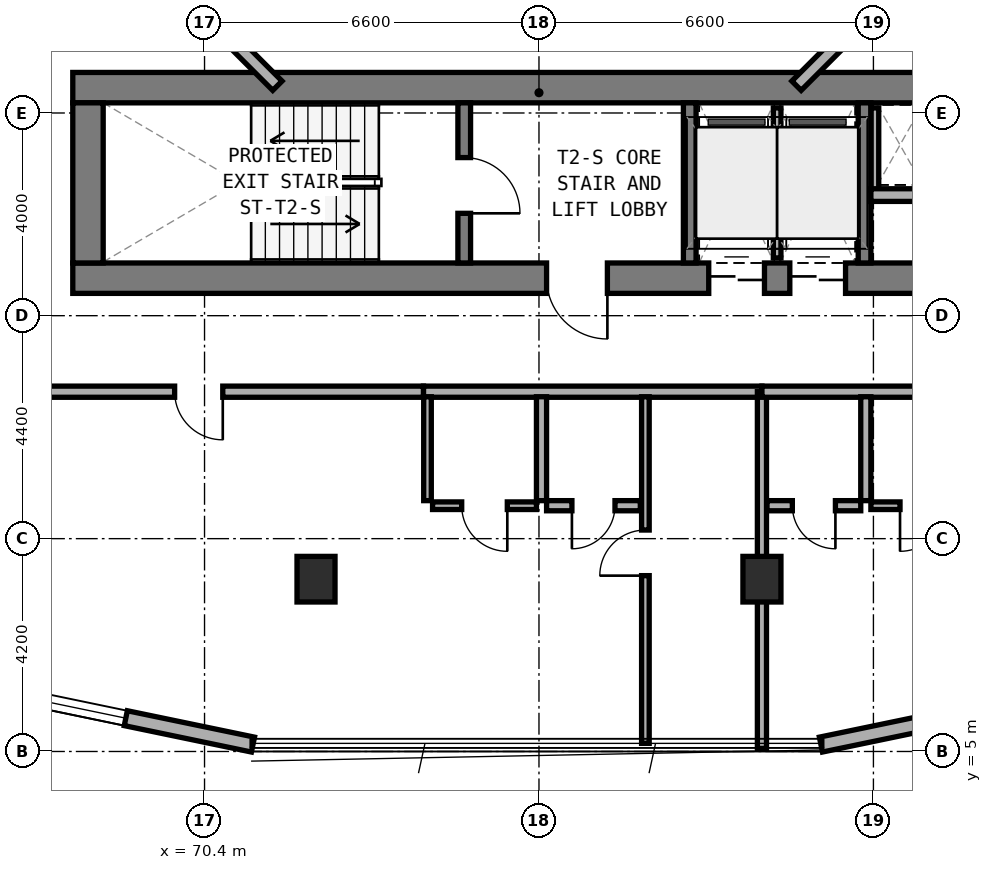
"""IFC4 building model, lengths in metres.
Left out: names, types, materials, properties, quantities, classifications, styles, units other than length and angle.
Written with IfcOpenShell. Run it as: python <this file> out.ifc"""

import sys

from ifc_helpers import new_model, si_unit, direction, frame, frame_2d, origin, origin_2d, place, context, subcontext, project, spatial, rectangle, extrude, element, fill, save


model = new_model("IFC4")
c1 = context("Model", 3, precision=1e-05, world=origin(), true_north=direction((0.0, 1.0)))
c2 = subcontext(c1, "Body", "Model", "MODEL_VIEW")
j1 = project(units=[si_unit("LENGTHUNIT", "METRE"), si_unit("PLANEANGLEUNIT", "RADIAN")], contexts=[c1])
p1 = place(None, origin())
s1 = spatial("IfcSite", under=j1, at=p1, CompositionType="ELEMENT")
p2 = place(p1, origin())
s2 = spatial("IfcBuilding", under=s1, at=p2, CompositionType="ELEMENT")
p3 = place(p2, frame((0.0, 0.0, 45.0)))
s3 = spatial("IfcBuildingStorey", under=s2, at=p3, CompositionType="ELEMENT", Elevation=45.0)
p4 = place(p3, frame((67.8, 14.34, 0.0), z_axis=(0.0, 0.0, 1.0), x_axis=(1.0, 0.0, 0.0)))
e1 = element("IfcWall", 1, at=p4, inside=s3, PredefinedType="SHEAR", context=c2, shape_type="SweptSolid", body=[
    extrude(rectangle(XDim=18.6, YDim=0.6, at=frame_2d((9.3, 0.0))), origin(), (0.0, 0.0, 1.0), 3.5),
])
p5 = place(p4, frame((9.35, 0.0, 0.0)))
e2 = element("IfcOpeningElement", 2, at=p5, cuts=e1, PredefinedType="OPENING", context=c2, shape_type="SweptSolid", body=[
    extrude(rectangle(XDim=1.2, YDim=2.15, at=frame_2d((0.6, 1.075))), frame((0.0, 0.31, 0.0), z_axis=(0.0, -1.0, 0.0), x_axis=(1.0, 0.0, 0.0)), (0.0, 0.0, 1.0), 0.62),
])
p6 = place(p4, frame((16.95, 0.0, 0.0)))
e3 = element("IfcOpeningElement", 3, at=p6, cuts=e1, PredefinedType="OPENING", context=c2, shape_type="SweptSolid", body=[
    extrude(rectangle(XDim=0.85, YDim=2.1, at=frame_2d((0.425, 1.05))), frame((0.0, 0.31, 0.0), z_axis=(0.0, -1.0, 0.0), x_axis=(1.0, 0.0, 0.0)), (0.0, 0.0, 1.0), 0.62),
])
p7 = place(p4, frame((12.55, 0.0, 0.0)))
e4 = element("IfcOpeningElement", 4, at=p7, cuts=e1, PredefinedType="OPENING", context=c2, shape_type="SweptSolid", body=[
    extrude(rectangle(XDim=1.1, YDim=2.15, at=frame_2d((0.55, 1.075))), frame((0.0, 0.31, 0.0), z_axis=(0.0, -1.0, 0.0), x_axis=(1.0, 0.0, 0.0)), (0.0, 0.0, 1.0), 0.62),
])
p8 = place(p4, frame((14.15, 0.0, 0.0)))
e5 = element("IfcOpeningElement", 5, at=p8, cuts=e1, PredefinedType="OPENING", context=c2, shape_type="SweptSolid", body=[
    extrude(rectangle(XDim=1.1, YDim=2.15, at=frame_2d((0.55, 1.075))), frame((0.0, 0.31, 0.0), z_axis=(0.0, -1.0, 0.0), x_axis=(1.0, 0.0, 0.0)), (0.0, 0.0, 1.0), 0.62),
])
p9 = place(p3, frame((67.8, 18.1, 0.0), z_axis=(0.0, 0.0, 1.0), x_axis=(1.0, 0.0, 0.0)))
e6 = element("IfcWall", 6, at=p9, inside=s3, PredefinedType="SHEAR", context=c2, shape_type="SweptSolid", body=[
    extrude(rectangle(XDim=18.6, YDim=0.6, at=frame_2d((9.3, 0.0))), origin(), (0.0, 0.0, 1.0), 3.5),
])
p10 = place(p3, frame((68.1, 14.64, 0.0), z_axis=(0.0, 0.0, 1.0), x_axis=(0.0, 1.0, 0.0)))
e7 = element("IfcWall", 7, at=p10, inside=s3, PredefinedType="SHEAR", context=c2, shape_type="SweptSolid", body=[
    extrude(rectangle(XDim=3.16, YDim=0.6, at=frame_2d((1.58, 0.0))), origin(), (0.0, 0.0, 1.0), 3.5),
])
p11 = place(p3, frame((75.525, 14.64, 0.0), z_axis=(0.0, 0.0, 1.0), x_axis=(0.0, 1.0, 0.0)))
e8 = element("IfcWall", 8, at=p11, inside=s3, PredefinedType="STANDARD", context=c2, shape_type="SweptSolid", body=[
    extrude(rectangle(XDim=3.16, YDim=0.25, at=frame_2d((1.58, 0.0))), origin(), (0.0, 0.0, 1.0), 3.25),
])
p12 = place(p11, frame((0.98, 0.0, 0.0)))
e9 = element("IfcOpeningElement", 9, at=p12, cuts=e8, PredefinedType="OPENING", context=c2, shape_type="SweptSolid", body=[
    extrude(rectangle(XDim=1.1, YDim=2.15, at=frame_2d((0.55, 1.075))), frame((0.0, 0.135, 0.0), z_axis=(0.0, -1.0, 0.0), x_axis=(1.0, 0.0, 0.0)), (0.0, 0.0, 1.0), 0.27),
])
for number, where, z_axis, x_axis in (
    (10, (79.975, 14.64, 0.0), (0.0, 0.0, 1.0), (0.0, 1.0, 0.0)),
    (11, (83.425, 14.64, 0.0), (0.0, 0.0, 1.0), (0.0, 1.0, 0.0)),
):
    element("IfcWall", number, at=place(p3, frame(where, z_axis=z_axis, x_axis=x_axis)), inside=s3, PredefinedType="STANDARD", context=c2, shape_type="SweptSolid", body=[
        extrude(rectangle(XDim=3.16, YDim=0.25, at=frame_2d((1.58, 0.0))), origin(), (0.0, 0.0, 1.0), 3.25),
    ])
for number, where, z_axis, x_axis in (
    (12, (72.6, 8.4, 0.0), (0.0, 0.0, 1.0), (1.0, 0.0, 0.0)),
    (13, (81.4, 8.4, 0.0), (0.0, 0.0, 1.0), (1.0, 0.0, 0.0)),
):
    element("IfcColumn", number, at=place(p3, frame(where, z_axis=z_axis, x_axis=x_axis)), inside=s3, PredefinedType="COLUMN", context=c2, shape_type="SweptSolid", body=[
        extrude(rectangle(XDim=0.75, YDim=0.9, at=origin_2d()), origin(), (0.0, 0.0, 1.0), 3.5),
    ])
p13 = place(p3, frame((62.622, 6.949, 0.0), z_axis=(0.0, 0.0, 1.0), x_axis=(0.979127260729, -0.203248142175, 0.0)))
e14 = element("IfcWall", 14, at=p13, inside=s3, PredefinedType="STANDARD", context=c2, shape_type="SweptSolid", body=[
    extrude(rectangle(XDim=8.92, YDim=0.3, at=frame_2d((4.46, 0.0))), origin(), (0.0, 0.0, 1.0), 3.25),
])
p14 = place(p13, frame((3.957, 0.0, 0.8)))
e15 = element("IfcOpeningElement", 15, at=p14, cuts=e14, PredefinedType="OPENING", context=c2, shape_type="SweptSolid", body=[
    extrude(rectangle(XDim=2.4, YDim=1.6, at=frame_2d((1.2, 0.8))), frame((0.0, 0.16, 0.0), z_axis=(0.0, -1.0, 0.0), x_axis=(1.0, 0.0, 0.0)), (0.0, 0.0, 1.0), 0.32),
])
p15 = place(p3, frame((82.564, 5.136, 0.0), z_axis=(0.0, 0.0, 1.0), x_axis=(0.979128391325, 0.203242695569, 0.0)))
e16 = element("IfcWall", 16, at=p15, inside=s3, PredefinedType="STANDARD", context=c2, shape_type="SweptSolid", body=[
    extrude(rectangle(XDim=8.92, YDim=0.3, at=frame_2d((4.46, 0.0))), origin(), (0.0, 0.0, 1.0), 3.25),
])
p16 = place(p15, frame((3.048, 0.0, 0.8)))
e17 = element("IfcOpeningElement", 17, at=p16, cuts=e16, PredefinedType="OPENING", context=c2, shape_type="SweptSolid", body=[
    extrude(rectangle(XDim=2.4, YDim=1.6, at=frame_2d((1.2, 0.8))), frame((0.0, 0.16, 0.0), z_axis=(0.0, -1.0, 0.0), x_axis=(1.0, 0.0, 0.0)), (0.0, 0.0, 1.0), 0.32),
])
for number, where, z_axis, x_axis in (
    (18, (82.082, 18.138, 0.0), (0.0, 0.0, 1.0), (0.707, 0.707, 0.0)),
    (19, (70.204, 19.772, 0.0), (0.0, 0.0, 1.0), (0.707, -0.707, 0.0)),
):
    element("IfcWall", number, at=place(p3, frame(where, z_axis=z_axis, x_axis=x_axis)), inside=s3, PredefinedType="STANDARD", context=c2, shape_type="SweptSolid", body=[
        extrude(rectangle(XDim=2.311, YDim=0.26, at=frame_2d((1.155, 0.0))), origin(), (0.0, 0.0, 1.0), 3.25),
    ])
p17 = place(p3, frame((83.63, 16.08, 0.0), z_axis=(0.0, 0.0, 1.0), x_axis=(0.0, 1.0, 0.0)))
e20 = element("IfcWall", 20, at=p17, inside=s3, PredefinedType="PARTITIONING", context=c2, shape_type="SweptSolid", body=[
    extrude(rectangle(XDim=1.62, YDim=0.15, at=frame_2d((0.81, 0.0))), origin(), (0.0, 0.0, 1.0), 2.725),
])
p18 = place(p3, frame((83.55, 15.98, 0.0), z_axis=(0.0, 0.0, 1.0), x_axis=(1.0, 0.0, 0.0)))
e21 = element("IfcWall", 21, at=p18, inside=s3, PredefinedType="SOLIDWALL", context=c2, shape_type="SweptSolid", body=[
    extrude(rectangle(XDim=1.13, YDim=0.25, at=frame_2d((0.565, 0.0))), origin(), (0.0, 0.0, 1.0), 3.22),
])
p19 = place(p3, frame((81.7, 14.74, 0.0), z_axis=(0.0, 0.0, 1.0), x_axis=(0.0, 1.0, 0.0)))
e22 = element("IfcWall", 22, at=p19, inside=s3, PredefinedType="PARTITIONING", context=c2, shape_type="SweptSolid", body=[
    extrude(rectangle(XDim=2.96, YDim=0.15, at=frame_2d((1.48, 0.0))), origin(), (0.0, 0.0, 1.0), 3.22),
])
p20 = place(p3, frame((74.72, 12.1, 0.0), z_axis=(0.0, 0.0, 1.0), x_axis=(1.0, 0.0, 0.0)))
e23 = element("IfcWall", 23, at=p20, inside=s3, PredefinedType="SOLIDWALL", context=c2, shape_type="SweptSolid", body=[
    extrude(rectangle(XDim=6.68, YDim=0.22, at=frame_2d((3.34, 0.0))), origin(), (0.0, 0.0, 1.0), 2.725),
])
p21 = place(p3, frame((65.85, 12.1, 0.0), z_axis=(0.0, 0.0, 1.0), x_axis=(1.0, 0.0, 0.0)))
e24 = element("IfcWall", 24, at=p21, inside=s3, PredefinedType="SOLIDWALL", context=c2, shape_type="SweptSolid", body=[
    extrude(rectangle(XDim=8.87, YDim=0.22, at=frame_2d((4.435, 0.0))), origin(), (0.0, 0.0, 1.0), 2.725),
])
p22 = place(p21, frame((3.96, 0.0, 0.0)))
e25 = element("IfcOpeningElement", 25, at=p22, cuts=e24, PredefinedType="OPENING", context=c2, shape_type="SweptSolid", body=[
    extrude(rectangle(XDim=0.95, YDim=2.1, at=frame_2d((0.475, 1.05))), frame((0.0, 0.12, 0.0), z_axis=(0.0, -1.0, 0.0), x_axis=(1.0, 0.0, 0.0)), (0.0, 0.0, 1.0), 0.24),
])
p23 = place(p3, frame((79.1, 5.16, 0.0), z_axis=(0.0, 0.0, 1.0), x_axis=(0.0, 1.0, 0.0)))
e26 = element("IfcWall", 26, at=p23, inside=s3, PredefinedType="PARTITIONING", context=c2, shape_type="SweptSolid", body=[
    extrude(rectangle(XDim=6.84, YDim=0.15, at=frame_2d((3.42, 0.0))), origin(), (0.0, 0.0, 1.0), 2.865),
])
p24 = place(p23, frame((3.31, 0.0, 0.0)))
e27 = element("IfcOpeningElement", 27, at=p24, cuts=e26, PredefinedType="OPENING", context=c2, shape_type="SweptSolid", body=[
    extrude(rectangle(XDim=0.9, YDim=2.1, at=frame_2d((0.45, 1.05))), frame((0.0, 0.085, 0.0), z_axis=(0.0, -1.0, 0.0), x_axis=(1.0, 0.0, 0.0)), (0.0, 0.0, 1.0), 0.17),
])
p25 = place(p3, frame((77.05, 9.95, 0.0), z_axis=(0.0, 0.0, 1.0), x_axis=(0.0, 1.0, 0.0)))
e28 = element("IfcWall", 28, at=p25, inside=s3, PredefinedType="PLUMBINGWALL", context=c2, shape_type="SweptSolid", body=[
    extrude(rectangle(XDim=2.05, YDim=0.2, at=frame_2d((1.025, 0.0))), origin(), (0.0, 0.0, 1.0), 2.955),
])
p26 = place(p3, frame((74.8, 9.95, 0.0), z_axis=(0.0, 0.0, 1.0), x_axis=(0.0, 1.0, 0.0)))
e29 = element("IfcWall", 29, at=p26, inside=s3, PredefinedType="PARTITIONING", context=c2, shape_type="SweptSolid", body=[
    extrude(rectangle(XDim=2.05, YDim=0.15, at=frame_2d((1.025, 0.0))), origin(), (0.0, 0.0, 1.0), 2.955),
])
p27 = place(p3, frame((77.15, 9.85, 0.0), z_axis=(0.0, 0.0, 1.0), x_axis=(1.0, 0.0, 0.0)))
e30 = element("IfcWall", 30, at=p27, inside=s3, PredefinedType="PLUMBINGWALL", context=c2, shape_type="SweptSolid", body=[
    extrude(rectangle(XDim=1.85, YDim=0.2, at=frame_2d((0.925, 0.0))), origin(), (0.0, 0.0, 1.0), 3.22),
])
p28 = place(p27, frame((0.5, 0.0, 0.0)))
e31 = element("IfcOpeningElement", 31, at=p28, cuts=e30, PredefinedType="OPENING", context=c2, shape_type="SweptSolid", body=[
    extrude(rectangle(XDim=0.85, YDim=2.1, at=frame_2d((0.425, 1.05))), frame((0.0, 0.11, 0.0), z_axis=(0.0, -1.0, 0.0), x_axis=(1.0, 0.0, 0.0)), (0.0, 0.0, 1.0), 0.22),
])
p29 = place(p3, frame((74.9, 9.85, 0.0), z_axis=(0.0, 0.0, 1.0), x_axis=(1.0, 0.0, 0.0)))
e32 = element("IfcWall", 32, at=p29, inside=s3, PredefinedType="PARTITIONING", context=c2, shape_type="SweptSolid", body=[
    extrude(rectangle(XDim=2.05, YDim=0.15, at=frame_2d((1.025, 0.0))), origin(), (0.0, 0.0, 1.0), 3.22),
])
p30 = place(p29, frame((0.575, 0.0, 0.0)))
e33 = element("IfcOpeningElement", 33, at=p30, cuts=e32, PredefinedType="OPENING", context=c2, shape_type="SweptSolid", body=[
    extrude(rectangle(XDim=0.9, YDim=2.1, at=frame_2d((0.45, 1.05))), frame((0.0, 0.085, 0.0), z_axis=(0.0, -1.0, 0.0), x_axis=(1.0, 0.0, 0.0)), (0.0, 0.0, 1.0), 0.17),
])
p31 = place(p3, frame((81.4, 5.06, 0.0), z_axis=(0.0, 0.0, 1.0), x_axis=(0.0, 1.0, 0.0)))
e34 = element("IfcWall", 34, at=p31, inside=s3, PredefinedType="SOLIDWALL", context=c2, shape_type="SweptSolid", body=[
    extrude(rectangle(XDim=7.04, YDim=0.18, at=frame_2d((3.52, 0.0))), origin(), (0.0, 0.0, 1.0), 2.725),
])
p32 = place(p3, frame((81.4, 12.1, 0.0), z_axis=(0.0, 0.0, 1.0), x_axis=(1.0, 0.0, 0.0)))
e35 = element("IfcWall", 35, at=p32, inside=s3, PredefinedType="SOLIDWALL", context=c2, shape_type="SweptSolid", body=[
    extrude(rectangle(XDim=4.38, YDim=0.22, at=frame_2d((2.19, 0.0))), origin(), (0.0, 0.0, 1.0), 2.725),
])
p33 = place(p3, frame((83.45, 9.95, 0.0), z_axis=(0.0, 0.0, 1.0), x_axis=(0.0, 1.0, 0.0)))
e36 = element("IfcWall", 36, at=p33, inside=s3, PredefinedType="PLUMBINGWALL", context=c2, shape_type="SweptSolid", body=[
    extrude(rectangle(XDim=2.05, YDim=0.2, at=frame_2d((1.025, 0.0))), origin(), (0.0, 0.0, 1.0), 3.22),
])
p34 = place(p3, frame((81.5, 9.85, 0.0), z_axis=(0.0, 0.0, 1.0), x_axis=(1.0, 0.0, 0.0)))
e37 = element("IfcWall", 37, at=p34, inside=s3, PredefinedType="PLUMBINGWALL", context=c2, shape_type="SweptSolid", body=[
    extrude(rectangle(XDim=1.85, YDim=0.2, at=frame_2d((0.925, 0.0))), origin(), (0.0, 0.0, 1.0), 2.725),
])
p35 = place(p34, frame((0.5, 0.0, 0.0)))
e38 = element("IfcOpeningElement", 38, at=p35, cuts=e37, PredefinedType="OPENING", context=c2, shape_type="SweptSolid", body=[
    extrude(rectangle(XDim=0.85, YDim=2.1, at=frame_2d((0.425, 1.05))), frame((0.0, 0.11, 0.0), z_axis=(0.0, -1.0, 0.0), x_axis=(1.0, 0.0, 0.0)), (0.0, 0.0, 1.0), 0.22),
])
p36 = place(p3, frame((83.55, 9.85, 0.0), z_axis=(0.0, 0.0, 1.0), x_axis=(1.0, 0.0, 0.0)))
e39 = element("IfcWall", 39, at=p36, inside=s3, PredefinedType="PARTITIONING", context=c2, shape_type="SweptSolid", body=[
    extrude(rectangle(XDim=2.05, YDim=0.15, at=frame_2d((1.025, 0.0))), origin(), (0.0, 0.0, 1.0), 3.22),
])
p37 = place(p36, frame((0.575, 0.0, 0.0)))
e40 = element("IfcOpeningElement", 40, at=p37, cuts=e39, PredefinedType="OPENING", context=c2, shape_type="SweptSolid", body=[
    extrude(rectangle(XDim=0.9, YDim=2.1, at=frame_2d((0.45, 1.05))), frame((0.0, 0.085, 0.0), z_axis=(0.0, -1.0, 0.0), x_axis=(1.0, 0.0, 0.0)), (0.0, 0.0, 1.0), 0.17),
])
p38 = place(p14, origin())
e41 = element("IfcWindow", 41, at=p38, inside=s3, PartitioningType="SINGLE_PANEL", PredefinedType="WINDOW", context=c2, shape_type="SweptSolid", body=[
    extrude(rectangle(XDim=2.4, YDim=1.6, at=frame_2d((1.2, 0.8))), frame((0.0, 0.03, 0.0), z_axis=(0.0, -1.0, 0.0), x_axis=(1.0, 0.0, 0.0)), (0.0, 0.0, 1.0), 0.06),
])
fill(e15, e41)
p39 = place(p12, frame((1.1, 0.0, 0.0), z_axis=(0.0, 0.0, 1.0), x_axis=(-1.0, 0.0, 0.0)))
e42 = element("IfcDoor", 42, at=p39, inside=s3, OperationType="SINGLE_SWING_RIGHT", PredefinedType="DOOR", context=c2, shape_type="SweptSolid", body=[
    extrude(rectangle(XDim=1.1, YDim=2.15, at=frame_2d((0.55, 1.075))), frame((0.0, 0.025, 0.0), z_axis=(0.0, -1.0, 0.0), x_axis=(1.0, 0.0, 0.0)), (0.0, 0.0, 1.0), 0.05),
])
fill(e9, e42)
p40 = place(p5, frame((1.2, 0.0, 0.0), z_axis=(0.0, 0.0, 1.0), x_axis=(-1.0, 0.0, 0.0)))
e43 = element("IfcDoor", 43, at=p40, inside=s3, OperationType="SINGLE_SWING_LEFT", PredefinedType="DOOR", context=c2, shape_type="SweptSolid", body=[
    extrude(rectangle(XDim=1.2, YDim=2.15, at=frame_2d((0.6, 1.075))), frame((0.0, 0.025, 0.0), z_axis=(0.0, -1.0, 0.0), x_axis=(1.0, 0.0, 0.0)), (0.0, 0.0, 1.0), 0.05),
])
fill(e2, e43)
p41 = place(p7, frame((1.1, 0.0, 0.0), z_axis=(0.0, 0.0, 1.0), x_axis=(-1.0, 0.0, 0.0)))
e44 = element("IfcDoor", 44, at=p41, inside=s3, OperationType="DOUBLE_DOOR_SLIDING", PredefinedType="DOOR", context=c2, shape_type="SweptSolid", body=[
    extrude(rectangle(XDim=1.1, YDim=2.15, at=frame_2d((0.55, 1.075))), frame((0.0, 0.025, 0.0), z_axis=(0.0, -1.0, 0.0), x_axis=(1.0, 0.0, 0.0)), (0.0, 0.0, 1.0), 0.05),
])
fill(e4, e44)
p42 = place(p8, frame((1.1, 0.0, 0.0), z_axis=(0.0, 0.0, 1.0), x_axis=(-1.0, 0.0, 0.0)))
e45 = element("IfcDoor", 45, at=p42, inside=s3, OperationType="DOUBLE_DOOR_SLIDING", PredefinedType="DOOR", context=c2, shape_type="SweptSolid", body=[
    extrude(rectangle(XDim=1.1, YDim=2.15, at=frame_2d((0.55, 1.075))), frame((0.0, 0.025, 0.0), z_axis=(0.0, -1.0, 0.0), x_axis=(1.0, 0.0, 0.0)), (0.0, 0.0, 1.0), 0.05),
])
fill(e5, e45)
p43 = place(p22, frame((0.95, 0.0, 0.0), z_axis=(0.0, 0.0, 1.0), x_axis=(-1.0, 0.0, 0.0)))
e46 = element("IfcDoor", 46, at=p43, inside=s3, OperationType="SINGLE_SWING_LEFT", PredefinedType="DOOR", context=c2, shape_type="SweptSolid", body=[
    extrude(rectangle(XDim=0.95, YDim=2.1, at=frame_2d((0.475, 1.05))), frame((0.0, 0.025, 0.0), z_axis=(0.0, -1.0, 0.0), x_axis=(1.0, 0.0, 0.0)), (0.0, 0.0, 1.0), 0.05),
])
fill(e25, e46)
p44 = place(p24, origin())
e47 = element("IfcDoor", 47, at=p44, inside=s3, OperationType="SINGLE_SWING_LEFT", PredefinedType="DOOR", context=c2, shape_type="SweptSolid", body=[
    extrude(rectangle(XDim=0.9, YDim=2.1, at=frame_2d((0.45, 1.05))), frame((0.0, 0.025, 0.0), z_axis=(0.0, -1.0, 0.0), x_axis=(1.0, 0.0, 0.0)), (0.0, 0.0, 1.0), 0.05),
])
fill(e27, e47)
p45 = place(p28, frame((0.85, 0.0, 0.0), z_axis=(0.0, 0.0, 1.0), x_axis=(-1.0, 0.0, 0.0)))
e48 = element("IfcDoor", 48, at=p45, inside=s3, OperationType="SINGLE_SWING_RIGHT", PredefinedType="DOOR", context=c2, shape_type="SweptSolid", body=[
    extrude(rectangle(XDim=0.85, YDim=2.1, at=frame_2d((0.425, 1.05))), frame((0.0, 0.025, 0.0), z_axis=(0.0, -1.0, 0.0), x_axis=(1.0, 0.0, 0.0)), (0.0, 0.0, 1.0), 0.05),
])
fill(e31, e48)
p46 = place(p30, frame((0.9, 0.0, 0.0), z_axis=(0.0, 0.0, 1.0), x_axis=(-1.0, 0.0, 0.0)))
e49 = element("IfcDoor", 49, at=p46, inside=s3, OperationType="SINGLE_SWING_LEFT", PredefinedType="DOOR", context=c2, shape_type="SweptSolid", body=[
    extrude(rectangle(XDim=0.9, YDim=2.1, at=frame_2d((0.45, 1.05))), frame((0.0, 0.025, 0.0), z_axis=(0.0, -1.0, 0.0), x_axis=(1.0, 0.0, 0.0)), (0.0, 0.0, 1.0), 0.05),
])
fill(e33, e49)
p47 = place(p35, frame((0.85, 0.0, 0.0), z_axis=(0.0, 0.0, 1.0), x_axis=(-1.0, 0.0, 0.0)))
e50 = element("IfcDoor", 50, at=p47, inside=s3, OperationType="SINGLE_SWING_LEFT", PredefinedType="DOOR", context=c2, shape_type="SweptSolid", body=[
    extrude(rectangle(XDim=0.85, YDim=2.1, at=frame_2d((0.425, 1.05))), frame((0.0, 0.025, 0.0), z_axis=(0.0, -1.0, 0.0), x_axis=(1.0, 0.0, 0.0)), (0.0, 0.0, 1.0), 0.05),
])
fill(e38, e50)
p48 = place(p37, frame((0.9, 0.0, 0.0), z_axis=(0.0, 0.0, 1.0), x_axis=(-1.0, 0.0, 0.0)))
e51 = element("IfcDoor", 51, at=p48, inside=s3, OperationType="SINGLE_SWING_RIGHT", PredefinedType="DOOR", context=c2, shape_type="SweptSolid", body=[
    extrude(rectangle(XDim=0.9, YDim=2.1, at=frame_2d((0.45, 1.05))), frame((0.0, 0.025, 0.0), z_axis=(0.0, -1.0, 0.0), x_axis=(1.0, 0.0, 0.0)), (0.0, 0.0, 1.0), 0.05),
])
fill(e40, e51)
save(model, sys.argv[1])
